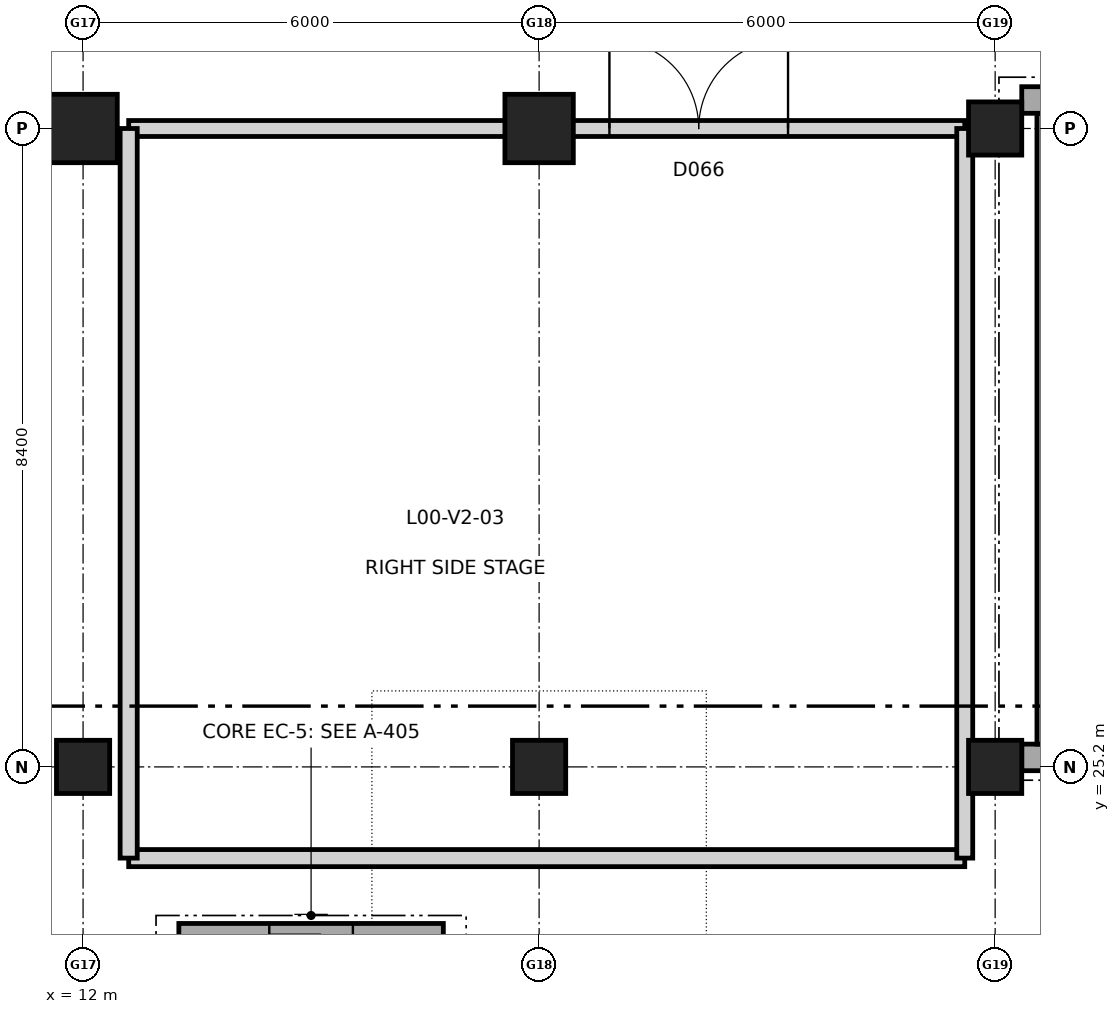
"""IFC4 building model, lengths in metres.
Left out: names, types, materials, properties, quantities, classifications, styles, units other than length and angle.
Written with IfcOpenShell. Run it as: python <this file> out.ifc"""

import sys

from ifc_helpers import new_model, si_unit, direction, frame, frame_2d, origin, origin_2d, place, context, subcontext, project, spatial, rectangle, extrude, element, fill, save


model = new_model("IFC4")
c1 = context("Model", 3, precision=1e-05, world=origin(), true_north=direction((0.0, 1.0)))
c2 = subcontext(c1, "Body", "Model", "MODEL_VIEW")
j1 = project(units=[si_unit("LENGTHUNIT", "METRE"), si_unit("PLANEANGLEUNIT", "RADIAN")], contexts=[c1])
p1 = place(None, origin())
s1 = spatial("IfcSite", under=j1, at=p1, CompositionType="ELEMENT")
p2 = place(p1, origin())
s2 = spatial("IfcBuilding", under=s1, at=p2, CompositionType="ELEMENT")
p3 = place(p2, origin())
s3 = spatial("IfcBuildingStorey", under=s2, at=p3, CompositionType="ELEMENT", Elevation=0.0)
p4 = place(p3, frame((12.0, 25.2, 0.0), z_axis=(0.0, 0.0, 1.0), x_axis=(1.0, 0.0, 0.0)))
e1 = element("IfcColumn", 1, at=p4, inside=s3, PredefinedType="COLUMN", context=c2, shape_type="SweptSolid", body=[
    extrude(rectangle(XDim=0.7, YDim=0.7, at=origin_2d()), origin(), (0.0, 0.0, 1.0), 5.4),
])
p5 = place(p3, frame((12.0, 33.6, 0.0), z_axis=(0.0, 0.0, 1.0), x_axis=(1.0, 0.0, 0.0)))
e2 = element("IfcColumn", 2, at=p5, inside=s3, PredefinedType="COLUMN", context=c2, shape_type="SweptSolid", body=[
    extrude(rectangle(XDim=0.9, YDim=0.9, at=origin_2d()), origin(), (0.0, 0.0, 1.0), 5.4),
])
p6 = place(p3, frame((18.0, 25.2, 0.0), z_axis=(0.0, 0.0, 1.0), x_axis=(1.0, 0.0, 0.0)))
e3 = element("IfcColumn", 3, at=p6, inside=s3, PredefinedType="COLUMN", context=c2, shape_type="SweptSolid", body=[
    extrude(rectangle(XDim=0.7, YDim=0.7, at=origin_2d()), origin(), (0.0, 0.0, 1.0), 5.4),
])
p7 = place(p3, frame((18.0, 33.6, 0.0), z_axis=(0.0, 0.0, 1.0), x_axis=(1.0, 0.0, 0.0)))
e4 = element("IfcColumn", 4, at=p7, inside=s3, PredefinedType="COLUMN", context=c2, shape_type="SweptSolid", body=[
    extrude(rectangle(XDim=0.9, YDim=0.9, at=origin_2d()), origin(), (0.0, 0.0, 1.0), 5.4),
])
for number, where, z_axis, x_axis in (
    (5, (24.0, 25.2, 0.0), (0.0, 0.0, 1.0), (1.0, 0.0, 0.0)),
    (6, (24.0, 33.6, 0.0), (0.0, 0.0, 1.0), (1.0, 0.0, 0.0)),
):
    element("IfcColumn", number, at=place(p3, frame(where, z_axis=z_axis, x_axis=x_axis)), inside=s3, PredefinedType="COLUMN", context=c2, shape_type="SweptSolid", body=[
        extrude(rectangle(XDim=0.7, YDim=0.7, at=origin_2d()), origin(), (0.0, 0.0, 1.0), 5.4),
    ])
p8 = place(p3, frame((29.7, 25.325, 0.0), z_axis=(0.0, 0.0, 1.0), x_axis=(-1.0, 0.0, 0.0)))
e7 = element("IfcWall", 7, at=p8, inside=s3, PredefinedType="SHEAR", context=c2, shape_type="SweptSolid", body=[
    extrude(rectangle(XDim=5.35, YDim=0.35, at=frame_2d((2.675, 0.0))), origin(), (0.0, 0.0, 1.0), 5.4),
])
p9 = place(p3, frame((24.725, 25.5, 0.0), z_axis=(0.0, 0.0, 1.0), x_axis=(0.0, 1.0, 0.0)))
e8 = element("IfcWall", 8, at=p9, inside=s3, PredefinedType="SHEAR", context=c2, shape_type="SweptSolid", body=[
    extrude(rectangle(XDim=8.3, YDim=0.35, at=frame_2d((4.15, 0.0))), origin(), (0.0, 0.0, 1.0), 5.4),
])
p10 = place(p3, frame((24.35, 33.975, 0.0), z_axis=(0.0, 0.0, 1.0), x_axis=(1.0, 0.0, 0.0)))
e9 = element("IfcWall", 9, at=p10, inside=s3, PredefinedType="SHEAR", context=c2, shape_type="SweptSolid", body=[
    extrude(rectangle(XDim=5.35, YDim=0.35, at=frame_2d((2.675, 0.0))), origin(), (0.0, 0.0, 1.0), 5.4),
])
p11 = place(p10, frame((2.97, 0.0, 0.0)))
e10 = element("IfcOpeningElement", 10, at=p11, cuts=e9, PredefinedType="OPENING", context=c2, shape_type="SweptSolid", body=[
    extrude(rectangle(XDim=1.18, YDim=2.15, at=frame_2d((0.59, 1.075))), frame((0.0, 0.185, 0.0), z_axis=(0.0, -1.0, 0.0), x_axis=(1.0, 0.0, 0.0)), (0.0, 0.0, 1.0), 0.37),
])
p12 = place(p3, frame((13.26, 22.945, 0.0), z_axis=(0.0, 0.0, 1.0), x_axis=(1.0, 0.0, 0.0)))
e11 = element("IfcWall", 11, at=p12, inside=s3, PredefinedType="SHEAR", context=c2, shape_type="SweptSolid", body=[
    extrude(rectangle(XDim=3.48, YDim=0.39, at=frame_2d((1.74, 0.0))), origin(), (0.0, 0.0, 1.0), 5.4),
])
p13 = place(p12, frame((1.19, 0.0, 0.0)))
e12 = element("IfcOpeningElement", 12, at=p13, cuts=e11, PredefinedType="OPENING", context=c2, shape_type="SweptSolid", body=[
    extrude(rectangle(XDim=1.1, YDim=2.15, at=frame_2d((0.55, 1.075))), frame((0.0, 0.205, 0.0), z_axis=(0.0, -1.0, 0.0), x_axis=(1.0, 0.0, 0.0)), (0.0, 0.0, 1.0), 0.41),
])
p14 = place(p3, frame((12.6, 24.0, 0.0), z_axis=(0.0, 0.0, 1.0), x_axis=(1.0, 0.0, 0.0)))
e13 = element("IfcWall", 13, at=p14, inside=s3, PredefinedType="PARTITIONING", context=c2, shape_type="SweptSolid", body=[
    extrude(rectangle(XDim=11.0, YDim=0.225, at=frame_2d((5.5, 0.0))), origin(), (0.0, 0.0, 1.0), 5.02),
])
p15 = place(p3, frame((12.6, 33.6, 0.0), z_axis=(0.0, 0.0, 1.0), x_axis=(1.0, 0.0, 0.0)))
e14 = element("IfcWall", 14, at=p15, inside=s3, PredefinedType="PARTITIONING", context=c2, shape_type="SweptSolid", body=[
    extrude(rectangle(XDim=11.0, YDim=0.21, at=frame_2d((5.5, 0.0))), origin(), (0.0, 0.0, 1.0), 3.665),
])
p16 = place(p15, frame((6.325, 0.0, 0.0)))
e15 = element("IfcOpeningElement", 15, at=p16, cuts=e14, PredefinedType="OPENING", context=c2, shape_type="SweptSolid", body=[
    extrude(rectangle(XDim=2.35, YDim=2.5, at=frame_2d((1.175, 1.25))), frame((0.0, 0.115, 0.0), z_axis=(0.0, -1.0, 0.0), x_axis=(1.0, 0.0, 0.0)), (0.0, 0.0, 1.0), 0.23),
])
p17 = place(p3, frame((12.6, 24.0, 0.0), z_axis=(0.0, 0.0, 1.0), x_axis=(0.0, 1.0, 0.0)))
e16 = element("IfcWall", 16, at=p17, inside=s3, PredefinedType="PARTITIONING", context=c2, shape_type="SweptSolid", body=[
    extrude(rectangle(XDim=9.6, YDim=0.225, at=frame_2d((4.8, 0.0))), origin(), (0.0, 0.0, 1.0), 5.02),
])
p18 = place(p3, frame((23.6, 24.0, 0.0), z_axis=(0.0, 0.0, 1.0), x_axis=(0.0, 1.0, 0.0)))
e17 = element("IfcWall", 17, at=p18, inside=s3, PredefinedType="PARTITIONING", context=c2, shape_type="SweptSolid", body=[
    extrude(rectangle(XDim=9.6, YDim=0.21, at=frame_2d((4.8, 0.0))), origin(), (0.0, 0.0, 1.0), 4.165),
])
p19 = place(p16, origin())
e18 = element("IfcDoor", 18, at=p19, inside=s3, OperationType="DOUBLE_DOOR_SINGLE_SWING", PredefinedType="DOOR", context=c2, shape_type="SweptSolid", body=[
    extrude(rectangle(XDim=2.35, YDim=2.5, at=frame_2d((1.175, 1.25))), frame((0.0, 0.025, 0.0), z_axis=(0.0, -1.0, 0.0), x_axis=(1.0, 0.0, 0.0)), (0.0, 0.0, 1.0), 0.05),
])
fill(e15, e18)
save(model, sys.argv[1])
